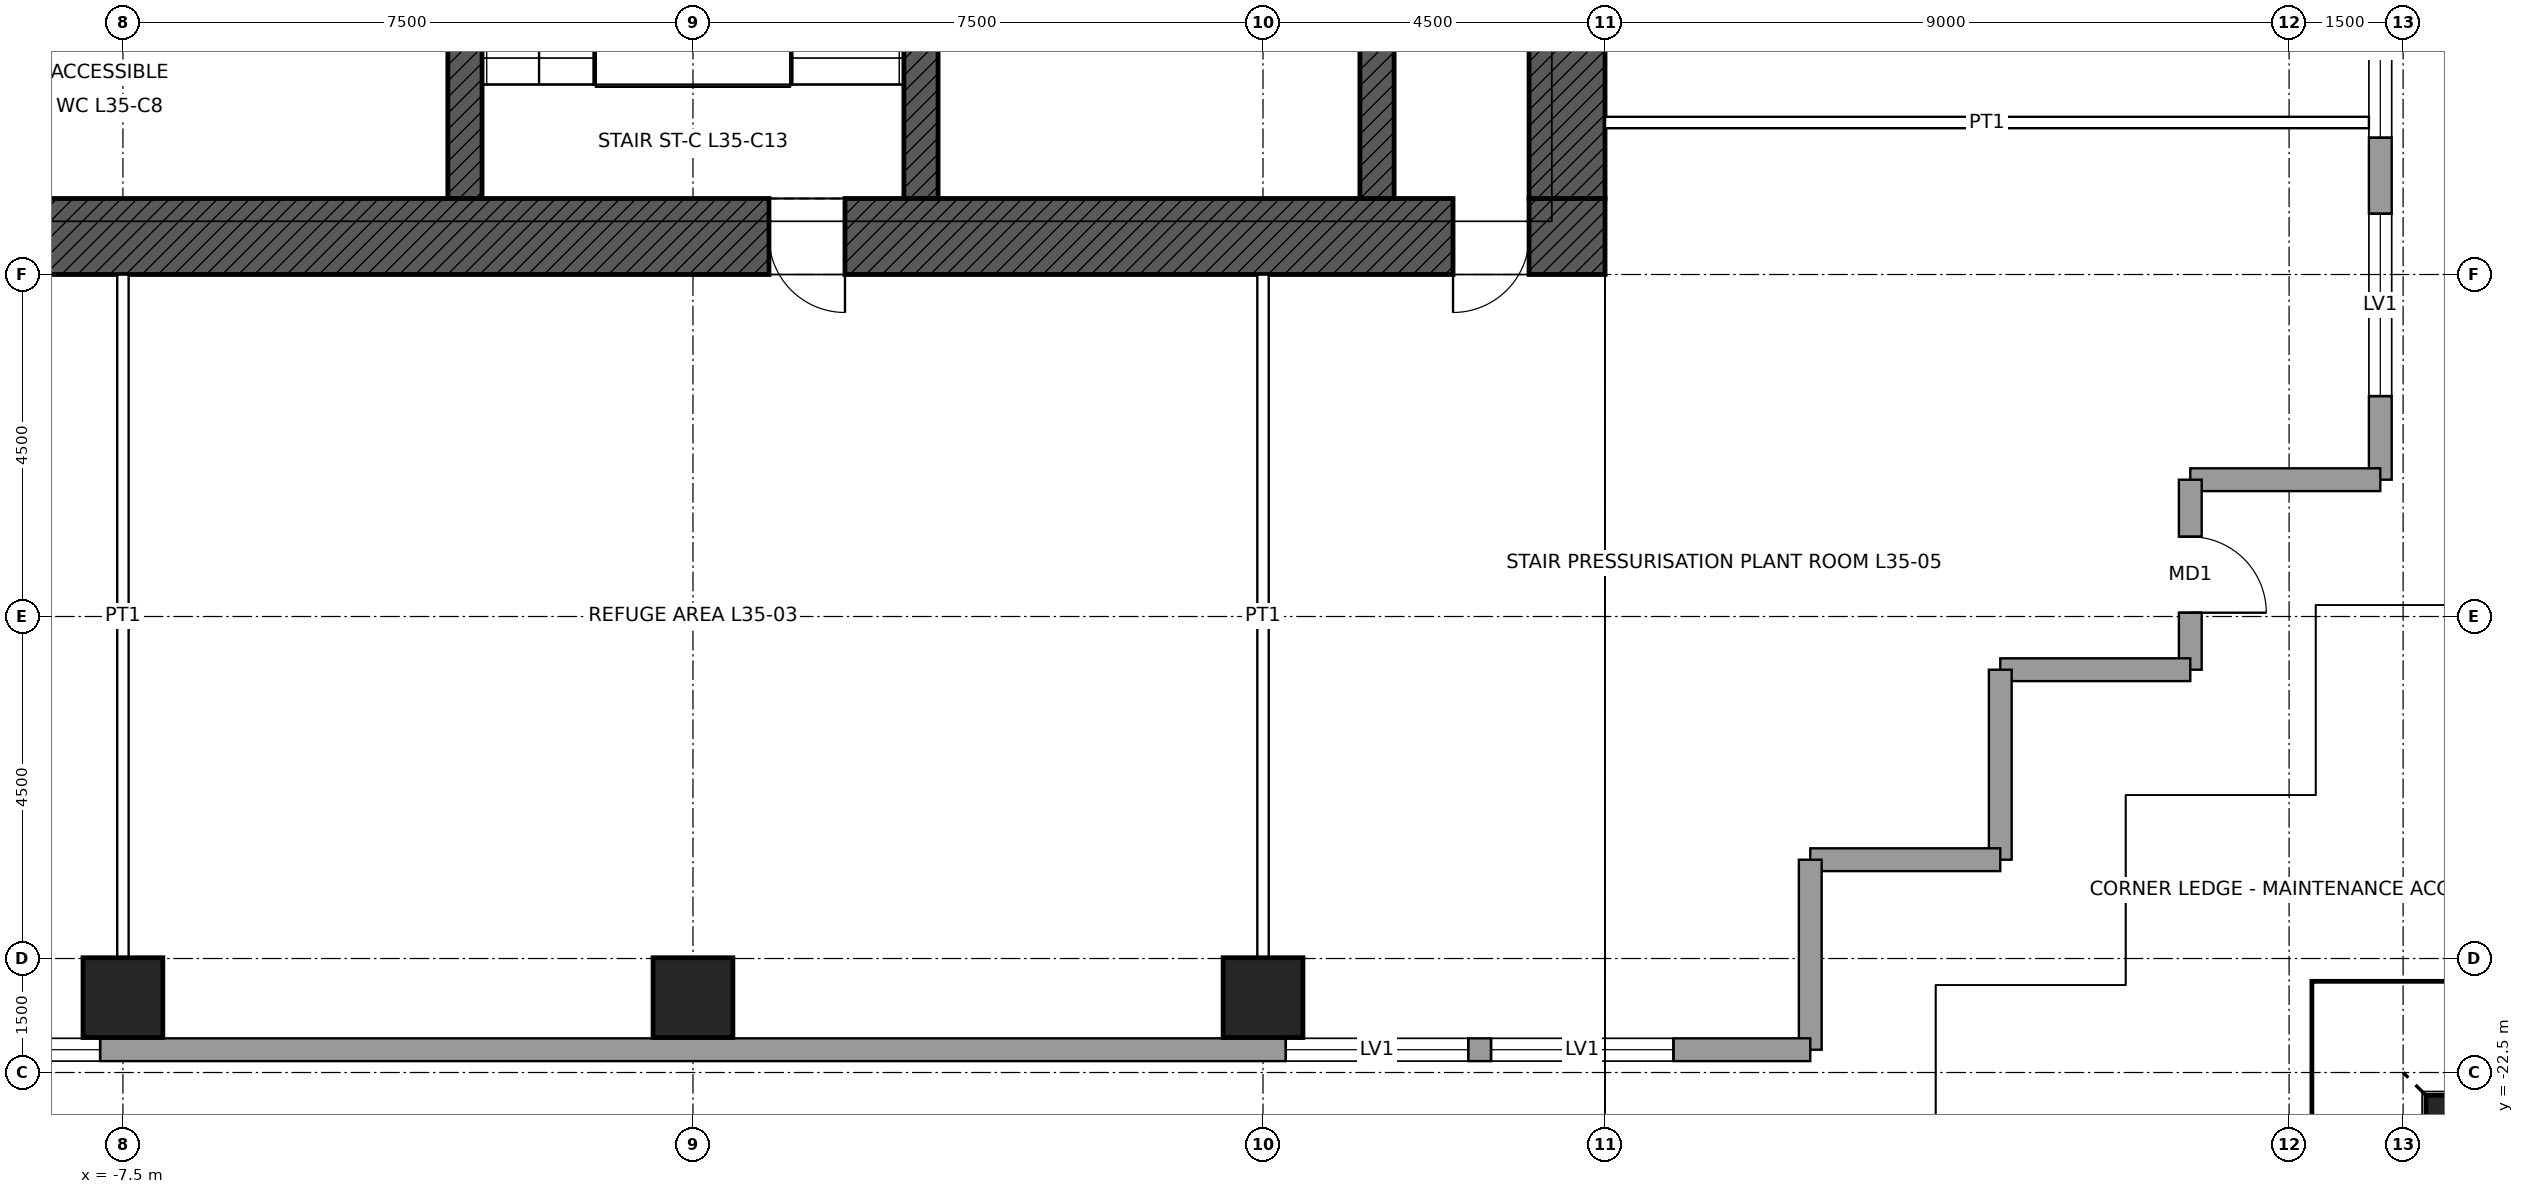
"""IFC4 building model, lengths in metres.
Left out: names, types, materials, properties, quantities, classifications, styles, units other than length and angle.
Written with IfcOpenShell. Run it as: python <this file> out.ifc"""

import sys

from ifc_helpers import new_model, si_unit, direction, frame, frame_2d, origin, origin_2d, place, context, subcontext, project, spatial, rectangle, hollow_rectangle, extrude, clip, halfspace, element, fill, save


model = new_model("IFC4")
c1 = context("Model", 3, precision=1e-05, world=origin(), true_north=direction((0.0, 1.0)))
c2 = subcontext(c1, "Body", "Model", "MODEL_VIEW")
j1 = project(units=[si_unit("LENGTHUNIT", "METRE"), si_unit("PLANEANGLEUNIT", "RADIAN")], contexts=[c1])
p1 = place(None, origin())
s1 = spatial("IfcSite", under=j1, at=p1, CompositionType="ELEMENT")
p2 = place(p1, origin())
s2 = spatial("IfcBuilding", under=s1, at=p2, CompositionType="ELEMENT")
p3 = place(p2, frame((0.0, 0.0, 171.9)))
s3 = spatial("IfcBuildingStorey", under=s2, at=p3, CompositionType="ELEMENT", Elevation=171.9)
p4 = place(p3, frame((24.0, -24.0, 0.0), z_axis=(-0.235702260396, 0.235702260396, 0.942809041582), x_axis=(-0.707106781187, -0.707106781187, 0.0)))
e1 = element("IfcColumn", 1, at=p4, inside=s3, PredefinedType="COLUMN", context=c2, shape_type="Clipping", body=[
    clip(clip(extrude(hollow_rectangle(XDim=2.4, YDim=2.4, WallThickness=0.12, at=origin_2d()), origin(), (0.0, 0.0, 1.0), 6.364), halfspace(frame((0.0, 0.0, 0.425)), True)), halfspace(frame((0.0, 0.0, 5.939)), False)),
])
p5 = place(p3, frame((12.0, -11.5, 0.0), z_axis=(0.0, 0.0, 1.0), x_axis=(-1.0, 0.0, 0.0)))
e2 = element("IfcWall", 2, at=p5, inside=s3, PredefinedType="SHEAR", context=c2, shape_type="SweptSolid", body=[
    extrude(rectangle(XDim=24.0, YDim=1.0, at=frame_2d((12.0, 0.0))), origin(), (0.0, 0.0, 1.0), 6.0),
])
p6 = place(p5, frame((10.0, 0.0, 0.0)))
e3 = element("IfcOpeningElement", 3, at=p6, cuts=e2, PredefinedType="OPENING", context=c2, shape_type="SweptSolid", body=[
    extrude(rectangle(XDim=1.0, YDim=2.1, at=frame_2d((0.5, 1.05))), frame((0.0, 0.51, 0.0), z_axis=(0.0, -1.0, 0.0), x_axis=(1.0, 0.0, 0.0)), (0.0, 0.0, 1.0), 1.02),
])
p7 = place(p5, frame((1.0, 0.0, 0.0)))
e4 = element("IfcOpeningElement", 4, at=p7, cuts=e2, PredefinedType="OPENING", context=c2, shape_type="SweptSolid", body=[
    extrude(rectangle(XDim=1.0, YDim=2.4, at=frame_2d((0.5, 1.2))), frame((0.0, 0.51, 0.0), z_axis=(0.0, -1.0, 0.0), x_axis=(1.0, 0.0, 0.0)), (0.0, 0.0, 1.0), 1.02),
])
p8 = place(p3, frame((11.5, 11.0, 0.0), z_axis=(0.0, 0.0, 1.0), x_axis=(0.0, -1.0, 0.0)))
e5 = element("IfcWall", 5, at=p8, inside=s3, PredefinedType="SHEAR", context=c2, shape_type="SweptSolid", body=[
    extrude(rectangle(XDim=22.0, YDim=1.0, at=frame_2d((11.0, 0.0))), origin(), (0.0, 0.0, 1.0), 6.0),
])
p9 = place(p8, frame((9.0, 0.0, 0.0)))
e6 = element("IfcOpeningElement", 6, at=p9, cuts=e5, PredefinedType="OPENING", context=c2, shape_type="SweptSolid", body=[
    extrude(rectangle(XDim=1.0, YDim=2.4, at=frame_2d((0.5, 1.2))), frame((0.0, 0.51, 0.0), z_axis=(0.0, -1.0, 0.0), x_axis=(1.0, 0.0, 0.0)), (0.0, 0.0, 1.0), 1.02),
])
p10 = place(p3, frame((9.0, -11.0, 0.0), z_axis=(0.0, 0.0, 1.0), x_axis=(0.0, 1.0, 0.0)))
e7 = element("IfcWall", 7, at=p10, inside=s3, PredefinedType="SHEAR", context=c2, shape_type="SweptSolid", body=[
    extrude(rectangle(XDim=6.5, YDim=0.45, at=frame_2d((3.25, 0.0))), origin(), (0.0, 0.0, 1.0), 6.0),
])
p11 = place(p10, frame((4.25, 0.0, 0.0)))
e8 = element("IfcOpeningElement", 8, at=p11, cuts=e7, PredefinedType="OPENING", context=c2, shape_type="SweptSolid", body=[
    extrude(rectangle(XDim=1.0, YDim=2.1, at=frame_2d((0.5, 1.05))), frame((0.0, 0.235, 0.0), z_axis=(0.0, -1.0, 0.0), x_axis=(1.0, 0.0, 0.0)), (0.0, 0.0, 1.0), 0.47),
])
for number, where, z_axis, x_axis in (
    (9, (-3.0, -11.0, 0.0), (0.0, 0.0, 1.0), (0.0, 1.0, 0.0)),
    (10, (3.0, -11.0, 0.0), (0.0, 0.0, 1.0), (0.0, 1.0, 0.0)),
):
    element("IfcWall", number, at=place(p3, frame(where, z_axis=z_axis, x_axis=x_axis)), inside=s3, PredefinedType="SHEAR", context=c2, shape_type="SweptSolid", body=[
        extrude(rectangle(XDim=6.5, YDim=0.45, at=frame_2d((3.25, 0.0))), origin(), (0.0, 0.0, 1.0), 6.0),
    ])
for number, where, z_axis, x_axis in (
    (11, (7.5, -21.515, -0.25), (0.0, 0.0, 1.0), (1.0, 0.0, 0.0)),
    (12, (0.0, -21.515, -0.25), (0.0, 0.0, 1.0), (1.0, 0.0, 0.0)),
    (13, (-7.5, -21.515, -0.25), (0.0, 0.0, 1.0), (1.0, 0.0, 0.0)),
):
    element("IfcColumn", number, at=place(p3, frame(where, z_axis=z_axis, x_axis=x_axis)), inside=s3, PredefinedType="COLUMN", context=c2, shape_type="SweptSolid", body=[
        extrude(hollow_rectangle(XDim=1.05, YDim=1.05, WallThickness=0.07, at=origin_2d()), origin(), (0.0, 0.0, 1.0), 6.25),
    ])
p12 = place(p3, frame((22.2, 14.7, 0.0), z_axis=(0.0, 0.0, 1.0), x_axis=(0.0, -1.0, 0.0)))
e14 = element("IfcWall", 14, at=p12, inside=s3, PredefinedType="SOLIDWALL", context=c2, shape_type="SweptSolid", body=[
    extrude(rectangle(XDim=29.4, YDim=0.3, at=frame_2d((14.7, 0.0))), origin(), (0.0, 0.0, 1.0), 5.85),
])
p13 = place(p12, frame((1.8, 0.0, 2.1)))
e15 = element("IfcOpeningElement", 15, at=p13, cuts=e14, PredefinedType="OPENING", context=c2, shape_type="SweptSolid", body=[
    extrude(rectangle(XDim=2.4, YDim=2.4, at=frame_2d((1.2, 1.2))), frame((0.0, 0.16, 0.0), z_axis=(0.0, -1.0, 0.0), x_axis=(1.0, 0.0, 0.0)), (0.0, 0.0, 1.0), 0.32),
])
p14 = place(p12, frame((4.5, 0.0, 2.1)))
e16 = element("IfcOpeningElement", 16, at=p14, cuts=e14, PredefinedType="OPENING", context=c2, shape_type="SweptSolid", body=[
    extrude(rectangle(XDim=2.4, YDim=2.4, at=frame_2d((1.2, 1.2))), frame((0.0, 0.16, 0.0), z_axis=(0.0, -1.0, 0.0), x_axis=(1.0, 0.0, 0.0)), (0.0, 0.0, 1.0), 0.32),
])
p15 = place(p12, frame((22.5, 0.0, 2.1)))
e17 = element("IfcOpeningElement", 17, at=p15, cuts=e14, PredefinedType="OPENING", context=c2, shape_type="SweptSolid", body=[
    extrude(rectangle(XDim=2.4, YDim=2.4, at=frame_2d((1.2, 1.2))), frame((0.0, 0.16, 0.0), z_axis=(0.0, -1.0, 0.0), x_axis=(1.0, 0.0, 0.0)), (0.0, 0.0, 1.0), 0.32),
])
p16 = place(p12, frame((25.9, 0.0, 2.1)))
e18 = element("IfcOpeningElement", 18, at=p16, cuts=e14, PredefinedType="OPENING", context=c2, shape_type="SweptSolid", body=[
    extrude(rectangle(XDim=2.4, YDim=2.4, at=frame_2d((1.2, 1.2))), frame((0.0, 0.16, 0.0), z_axis=(0.0, -1.0, 0.0), x_axis=(1.0, 0.0, 0.0)), (0.0, 0.0, 1.0), 0.32),
])
p17 = place(p3, frame((22.2, -14.7, 0.0), z_axis=(0.0, 0.0, 1.0), x_axis=(-1.0, 0.0, 0.0)))
e19 = element("IfcWall", 19, at=p17, inside=s3, PredefinedType="SOLIDWALL", context=c2, shape_type="SweptSolid", body=[
    extrude(rectangle(XDim=2.5, YDim=0.3, at=frame_2d((1.25, 0.0))), origin(), (0.0, 0.0, 1.0), 5.85),
])
p18 = place(p3, frame((19.7, -14.7, 0.0), z_axis=(0.0, 0.0, 1.0), x_axis=(0.0, -1.0, 0.0)))
e20 = element("IfcWall", 20, at=p18, inside=s3, PredefinedType="SOLIDWALL", context=c2, shape_type="SweptSolid", body=[
    extrude(rectangle(XDim=2.5, YDim=0.3, at=frame_2d((1.25, 0.0))), origin(), (0.0, 0.0, 1.0), 5.85),
])
p19 = place(p18, frame((0.75, 0.0, 0.0)))
e21 = element("IfcOpeningElement", 21, at=p19, cuts=e20, PredefinedType="OPENING", context=c2, shape_type="SweptSolid", body=[
    extrude(rectangle(XDim=1.0, YDim=2.1, at=frame_2d((0.5, 1.05))), frame((0.0, 0.16, 0.0), z_axis=(0.0, -1.0, 0.0), x_axis=(1.0, 0.0, 0.0)), (0.0, 0.0, 1.0), 0.32),
])
for number, where, z_axis, x_axis in (
    (22, (19.7, -17.2, 0.0), (0.0, 0.0, 1.0), (-1.0, 0.0, 0.0)),
    (23, (17.2, -17.2, 0.0), (0.0, 0.0, 1.0), (0.0, -1.0, 0.0)),
    (24, (17.2, -19.7, 0.0), (0.0, 0.0, 1.0), (-1.0, 0.0, 0.0)),
    (25, (14.7, -19.7, 0.0), (0.0, 0.0, 1.0), (0.0, -1.0, 0.0)),
):
    element("IfcWall", number, at=place(p3, frame(where, z_axis=z_axis, x_axis=x_axis)), inside=s3, PredefinedType="SOLIDWALL", context=c2, shape_type="SweptSolid", body=[
        extrude(rectangle(XDim=2.5, YDim=0.3, at=frame_2d((1.25, 0.0))), origin(), (0.0, 0.0, 1.0), 5.85),
    ])
p20 = place(p3, frame((14.7, -22.2, 0.0), z_axis=(0.0, 0.0, 1.0), x_axis=(-1.0, 0.0, 0.0)))
e26 = element("IfcWall", 26, at=p20, inside=s3, PredefinedType="SOLIDWALL", context=c2, shape_type="SweptSolid", body=[
    extrude(rectangle(XDim=29.4, YDim=0.3, at=frame_2d((14.7, 0.0))), origin(), (0.0, 0.0, 1.0), 5.85),
])
p21 = place(p20, frame((1.8, 0.0, 2.1)))
e27 = element("IfcOpeningElement", 27, at=p21, cuts=e26, PredefinedType="OPENING", context=c2, shape_type="SweptSolid", body=[
    extrude(rectangle(XDim=2.4, YDim=2.4, at=frame_2d((1.2, 1.2))), frame((0.0, 0.16, 0.0), z_axis=(0.0, -1.0, 0.0), x_axis=(1.0, 0.0, 0.0)), (0.0, 0.0, 1.0), 0.32),
])
p22 = place(p20, frame((4.5, 0.0, 2.1)))
e28 = element("IfcOpeningElement", 28, at=p22, cuts=e26, PredefinedType="OPENING", context=c2, shape_type="SweptSolid", body=[
    extrude(rectangle(XDim=2.4, YDim=2.4, at=frame_2d((1.2, 1.2))), frame((0.0, 0.16, 0.0), z_axis=(0.0, -1.0, 0.0), x_axis=(1.0, 0.0, 0.0)), (0.0, 0.0, 1.0), 0.32),
])
p23 = place(p20, frame((22.5, 0.0, 2.1)))
e29 = element("IfcOpeningElement", 29, at=p23, cuts=e26, PredefinedType="OPENING", context=c2, shape_type="SweptSolid", body=[
    extrude(rectangle(XDim=2.4, YDim=2.4, at=frame_2d((1.2, 1.2))), frame((0.0, 0.16, 0.0), z_axis=(0.0, -1.0, 0.0), x_axis=(1.0, 0.0, 0.0)), (0.0, 0.0, 1.0), 0.32),
])
p24 = place(p20, frame((25.9, 0.0, 2.1)))
e30 = element("IfcOpeningElement", 30, at=p24, cuts=e26, PredefinedType="OPENING", context=c2, shape_type="SweptSolid", body=[
    extrude(rectangle(XDim=2.4, YDim=2.4, at=frame_2d((1.2, 1.2))), frame((0.0, 0.16, 0.0), z_axis=(0.0, -1.0, 0.0), x_axis=(1.0, 0.0, 0.0)), (0.0, 0.0, 1.0), 0.32),
])
for number, where, z_axis, x_axis in (
    (31, (-7.5, -12.0, 0.0), (0.0, 0.0, 1.0), (0.0, -1.0, 0.0)),
    (32, (7.5, -12.0, 0.0), (0.0, 0.0, 1.0), (0.0, -1.0, 0.0)),
):
    element("IfcWall", number, at=place(p3, frame(where, z_axis=z_axis, x_axis=x_axis)), inside=s3, PredefinedType="PARTITIONING", context=c2, shape_type="SweptSolid", body=[
        extrude(rectangle(XDim=8.99, YDim=0.15, at=frame_2d((4.495, 0.0))), origin(), (0.0, 0.0, 1.0), 5.85),
    ])
p25 = place(p3, frame((12.0, -10.0, 0.0), z_axis=(0.0, 0.0, 1.0), x_axis=(1.0, 0.0, 0.0)))
e33 = element("IfcWall", 33, at=p25, inside=s3, PredefinedType="PARTITIONING", context=c2, shape_type="SweptSolid", body=[
    extrude(rectangle(XDim=10.05, YDim=0.15, at=frame_2d((5.025, 0.0))), origin(), (0.0, 0.0, 1.0), 5.85),
])
p26 = place(p15, origin())
e34 = element("IfcWindow", 34, at=p26, inside=s3, PartitioningType="SINGLE_PANEL", PredefinedType="WINDOW", context=c2, shape_type="SweptSolid", body=[
    extrude(rectangle(XDim=2.4, YDim=2.4, at=frame_2d((1.2, 1.2))), frame((0.0, 0.15, 0.0), z_axis=(0.0, -1.0, 0.0), x_axis=(1.0, 0.0, 0.0)), (0.0, 0.0, 1.0), 0.06),
])
fill(e17, e34)
p27 = place(p16, origin())
e35 = element("IfcWindow", 35, at=p27, inside=s3, PartitioningType="SINGLE_PANEL", PredefinedType="WINDOW", context=c2, shape_type="SweptSolid", body=[
    extrude(rectangle(XDim=2.4, YDim=2.4, at=frame_2d((1.2, 1.2))), frame((0.0, 0.15, 0.0), z_axis=(0.0, -1.0, 0.0), x_axis=(1.0, 0.0, 0.0)), (0.0, 0.0, 1.0), 0.06),
])
fill(e18, e35)
p28 = place(p19, origin())
e36 = element("IfcDoor", 36, at=p28, inside=s3, OperationType="SINGLE_SWING_RIGHT", PredefinedType="DOOR", context=c2, shape_type="SweptSolid", body=[
    extrude(rectangle(XDim=1.0, YDim=2.1, at=frame_2d((0.5, 1.05))), frame((0.0, 0.025, 0.0), z_axis=(0.0, -1.0, 0.0), x_axis=(1.0, 0.0, 0.0)), (0.0, 0.0, 1.0), 0.05),
])
fill(e21, e36)
p29 = place(p21, origin())
e37 = element("IfcWindow", 37, at=p29, inside=s3, PartitioningType="SINGLE_PANEL", PredefinedType="WINDOW", context=c2, shape_type="SweptSolid", body=[
    extrude(rectangle(XDim=2.4, YDim=2.4, at=frame_2d((1.2, 1.2))), frame((0.0, 0.15, 0.0), z_axis=(0.0, -1.0, 0.0), x_axis=(1.0, 0.0, 0.0)), (0.0, 0.0, 1.0), 0.06),
])
fill(e27, e37)
p30 = place(p22, origin())
e38 = element("IfcWindow", 38, at=p30, inside=s3, PartitioningType="SINGLE_PANEL", PredefinedType="WINDOW", context=c2, shape_type="SweptSolid", body=[
    extrude(rectangle(XDim=2.4, YDim=2.4, at=frame_2d((1.2, 1.2))), frame((0.0, 0.15, 0.0), z_axis=(0.0, -1.0, 0.0), x_axis=(1.0, 0.0, 0.0)), (0.0, 0.0, 1.0), 0.06),
])
fill(e28, e38)
p31 = place(p23, origin())
e39 = element("IfcWindow", 39, at=p31, inside=s3, PartitioningType="SINGLE_PANEL", PredefinedType="WINDOW", context=c2, shape_type="SweptSolid", body=[
    extrude(rectangle(XDim=2.4, YDim=2.4, at=frame_2d((1.2, 1.2))), frame((0.0, 0.15, 0.0), z_axis=(0.0, -1.0, 0.0), x_axis=(1.0, 0.0, 0.0)), (0.0, 0.0, 1.0), 0.06),
])
fill(e29, e39)
p32 = place(p6, origin())
e40 = element("IfcDoor", 40, at=p32, inside=s3, OperationType="SINGLE_SWING_LEFT", PredefinedType="DOOR", context=c2, shape_type="SweptSolid", body=[
    extrude(rectangle(XDim=1.0, YDim=2.1, at=frame_2d((0.5, 1.05))), frame((0.0, 0.485, 0.0), z_axis=(0.0, -1.0, 0.0), x_axis=(1.0, 0.0, 0.0)), (0.0, 0.0, 1.0), 0.05),
])
fill(e3, e40)
p33 = place(p7, origin())
e41 = element("IfcDoor", 41, at=p33, inside=s3, OperationType="SINGLE_SWING_RIGHT", PredefinedType="DOOR", context=c2, shape_type="SweptSolid", body=[
    extrude(rectangle(XDim=1.0, YDim=2.4, at=frame_2d((0.5, 1.2))), frame((0.0, 0.485, 0.0), z_axis=(0.0, -1.0, 0.0), x_axis=(1.0, 0.0, 0.0)), (0.0, 0.0, 1.0), 0.05),
])
fill(e4, e41)
save(model, sys.argv[1])
